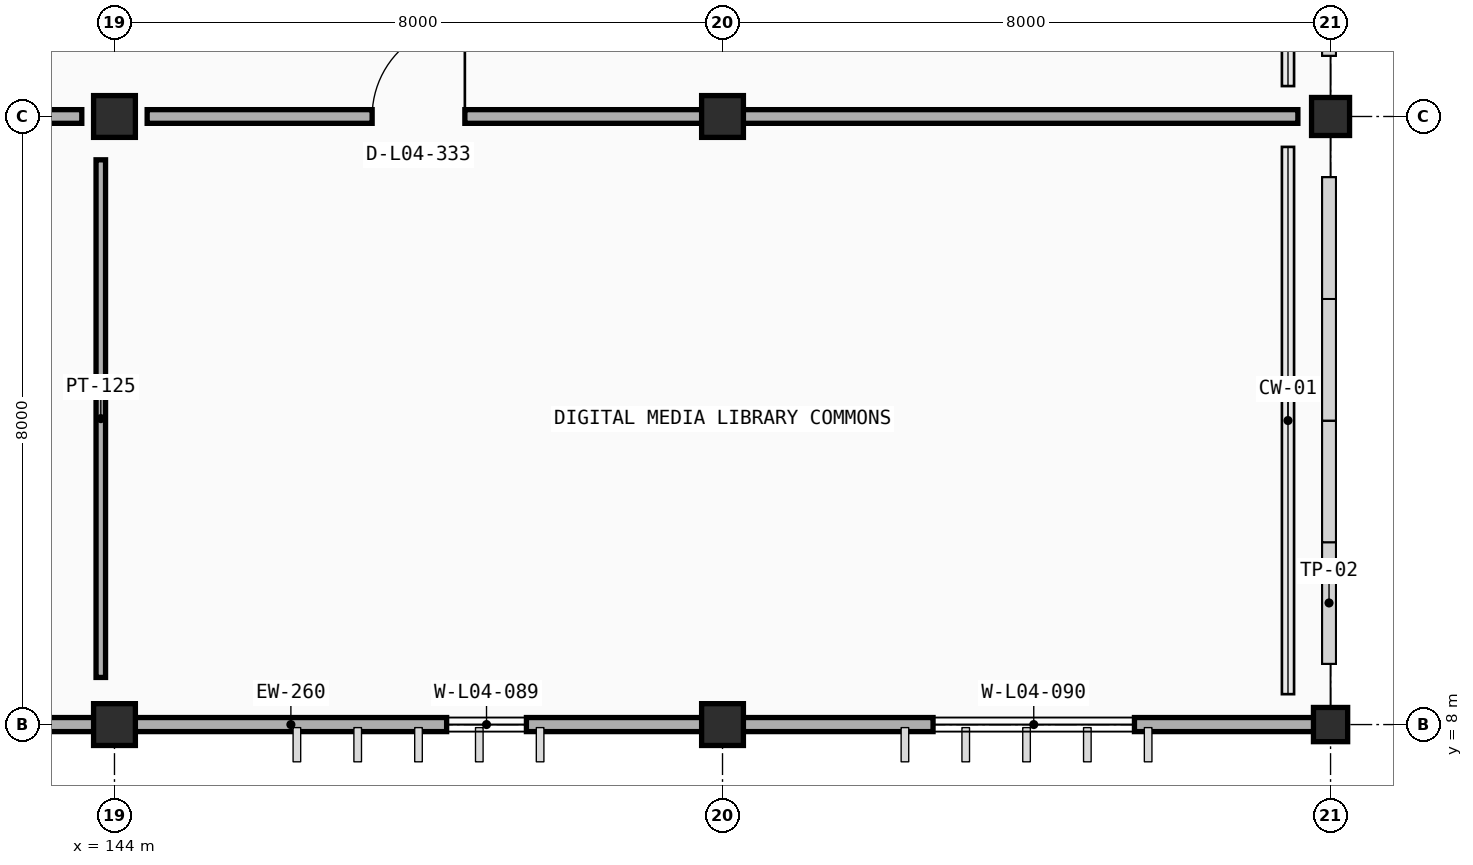
"""IFC4 building model, lengths in metres.
Left out: names, types, materials, properties, quantities, classifications, styles, units other than length and angle.
Written with IfcOpenShell. Run it as: python <this file> out.ifc"""

import sys

from ifc_helpers import new_model, si_unit, direction, frame, frame_2d, origin, origin_2d, place, context, subcontext, project, spatial, rectangle, extrude, element, fill, save


model = new_model("IFC4")
c1 = context("Model", 3, precision=1e-05, world=origin(), true_north=direction((0.0, 1.0)))
c2 = subcontext(c1, "Body", "Model", "MODEL_VIEW")
j1 = project(units=[si_unit("LENGTHUNIT", "METRE"), si_unit("PLANEANGLEUNIT", "RADIAN")], contexts=[c1])
p1 = place(None, origin())
s1 = spatial("IfcSite", under=j1, at=p1, CompositionType="ELEMENT")
p2 = place(p1, origin())
s2 = spatial("IfcBuilding", under=s1, at=p2, CompositionType="ELEMENT")
p3 = place(p2, frame((0.0, 0.0, 13.8)))
s3 = spatial("IfcBuildingStorey", under=s2, at=p3, CompositionType="ELEMENT", Elevation=13.8)
for number, where, z_axis, x_axis in (
    (1, (144.0, 8.0, 0.0), (0.0, 0.0, 1.0), (1.0, 0.0, 0.0)),
    (2, (152.0, 8.0, 0.0), (0.0, 0.0, 1.0), (1.0, 0.0, 0.0)),
):
    element("IfcColumn", number, at=place(p3, frame(where, z_axis=z_axis, x_axis=x_axis)), inside=s3, PredefinedType="COLUMN", context=c2, shape_type="SweptSolid", body=[
        extrude(rectangle(XDim=0.55, YDim=0.55, at=origin_2d()), origin(), (0.0, 0.0, 1.0), 4.2),
    ])
p4 = place(p3, frame((160.0, 8.0, 0.0), z_axis=(0.0, 0.0, 1.0), x_axis=(1.0, 0.0, 0.0)))
e3 = element("IfcColumn", 3, at=p4, inside=s3, PredefinedType="COLUMN", context=c2, shape_type="SweptSolid", body=[
    extrude(rectangle(XDim=0.45, YDim=0.45, at=origin_2d()), origin(), (0.0, 0.0, 1.0), 4.2),
])
for number, where, z_axis, x_axis in (
    (4, (144.0, 16.0, 0.0), (0.0, 0.0, 1.0), (1.0, 0.0, 0.0)),
    (5, (152.0, 16.0, 0.0), (0.0, 0.0, 1.0), (1.0, 0.0, 0.0)),
):
    element("IfcColumn", number, at=place(p3, frame(where, z_axis=z_axis, x_axis=x_axis)), inside=s3, PredefinedType="COLUMN", context=c2, shape_type="SweptSolid", body=[
        extrude(rectangle(XDim=0.55, YDim=0.55, at=origin_2d()), origin(), (0.0, 0.0, 1.0), 4.2),
    ])
p5 = place(p3, frame((160.0, 16.0, 0.0), z_axis=(0.0, 0.0, 1.0), x_axis=(1.0, 0.0, 0.0)))
e6 = element("IfcColumn", 6, at=p5, inside=s3, PredefinedType="COLUMN", context=c2, shape_type="SweptSolid", body=[
    extrude(rectangle(XDim=0.5, YDim=0.5, at=origin_2d()), origin(), (0.0, 0.0, 1.0), 4.2),
])
p6 = place(p3, frame((143.728, 8.0, 0.0), z_axis=(0.0, 0.0, 1.0), x_axis=(-1.0, 0.0, 0.0)))
e7 = element("IfcWall", 7, at=p6, inside=s3, PredefinedType="STANDARD", context=c2, shape_type="SweptSolid", body=[
    extrude(rectangle(XDim=7.456, YDim=0.185, at=frame_2d((3.728, 0.0))), origin(), (0.0, 0.0, 1.0), 3.325),
])
p7 = place(p6, frame((2.308, 0.0, 0.9)))
e8 = element("IfcOpeningElement", 8, at=p7, cuts=e7, PredefinedType="OPENING", context=c2, shape_type="SweptSolid", body=[
    extrude(rectangle(XDim=2.85, YDim=1.25, at=frame_2d((1.425, 0.625))), frame((0.0, 0.103, 0.0), z_axis=(0.0, -1.0, 0.0), x_axis=(1.0, 0.0, 0.0)), (0.0, 0.0, 1.0), 0.205),
])
p8 = place(p3, frame((151.728, 8.0, 0.0), z_axis=(0.0, 0.0, 1.0), x_axis=(-1.0, 0.0, 0.0)))
e9 = element("IfcWall", 9, at=p8, inside=s3, PredefinedType="STANDARD", context=c2, shape_type="SweptSolid", body=[
    extrude(rectangle(XDim=7.456, YDim=0.185, at=frame_2d((3.728, 0.0))), origin(), (0.0, 0.0, 1.0), 3.325),
])
p9 = place(p8, frame((2.308, 0.0, 0.9)))
e10 = element("IfcOpeningElement", 10, at=p9, cuts=e9, PredefinedType="OPENING", context=c2, shape_type="SweptSolid", body=[
    extrude(rectangle(XDim=1.05, YDim=1.4, at=frame_2d((0.525, 0.7))), frame((0.0, 0.103, 0.0), z_axis=(0.0, -1.0, 0.0), x_axis=(1.0, 0.0, 0.0)), (0.0, 0.0, 1.0), 0.205),
])
p10 = place(p3, frame((159.778, 8.0, 0.0), z_axis=(0.0, 0.0, 1.0), x_axis=(-1.0, 0.0, 0.0)))
e11 = element("IfcWall", 11, at=p10, inside=s3, PredefinedType="STANDARD", context=c2, shape_type="SweptSolid", body=[
    extrude(rectangle(XDim=7.506, YDim=0.185, at=frame_2d((3.753, 0.0))), origin(), (0.0, 0.0, 1.0), 3.35),
])
p11 = place(p10, frame((2.358, 0.0, 0.9)))
e12 = element("IfcOpeningElement", 12, at=p11, cuts=e11, PredefinedType="OPENING", context=c2, shape_type="SweptSolid", body=[
    extrude(rectangle(XDim=2.65, YDim=1.25, at=frame_2d((1.325, 0.625))), frame((0.0, 0.103, 0.0), z_axis=(0.0, -1.0, 0.0), x_axis=(1.0, 0.0, 0.0)), (0.0, 0.0, 1.0), 0.205),
])
for number, where, z_axis, x_axis in (
    (13, (159.76, 8.22, 0.0), (0.0, 0.0, 1.0), (-1.0, 0.0, 0.0)),
    (14, (159.76, 15.78, 0.0), (0.0, 0.0, 1.0), (-1.0, 0.0, 0.0)),
    (15, (159.76, 16.22, 0.0), (0.0, 0.0, 1.0), (-1.0, 0.0, 0.0)),
):
    element("IfcWall", number, at=place(p3, frame(where, z_axis=z_axis, x_axis=x_axis)), inside=s3, PredefinedType="PARAPET", context=c2, shape_type="SweptSolid", body=[
        extrude(rectangle(XDim=0.32, YDim=0.2, at=frame_2d((0.16, 0.0))), origin(), (0.0, 0.0, 1.0), 3.35),
    ])
p12 = place(p3, frame((160.26, 3.98, -0.02), z_axis=(0.0, 0.0, 1.0), x_axis=(0.0, 1.0, 0.0)))
e16 = element("IfcWall", 16, at=p12, inside=s3, PredefinedType="PARAPET", context=c2, shape_type="SweptSolid", body=[
    extrude(rectangle(XDim=3.98, YDim=0.2, at=frame_2d((1.99, 0.0))), origin(), (0.0, 0.0, 1.0), 1.001),
])
p13 = place(p3, frame((160.26, 7.96, -0.02), z_axis=(0.0, 0.0, 1.0), x_axis=(0.0, 1.0, 0.0)))
e17 = element("IfcWall", 17, at=p13, inside=s3, PredefinedType="PARAPET", context=c2, shape_type="SweptSolid", body=[
    extrude(rectangle(XDim=3.98, YDim=0.2, at=frame_2d((1.99, 0.0))), origin(), (0.0, 0.0, 1.0), 1.502),
])
p14 = place(p3, frame((160.26, 11.94, -0.02), z_axis=(0.0, 0.0, 1.0), x_axis=(0.0, 1.0, 0.0)))
e18 = element("IfcWall", 18, at=p14, inside=s3, PredefinedType="PARAPET", context=c2, shape_type="SweptSolid", body=[
    extrude(rectangle(XDim=3.98, YDim=0.2, at=frame_2d((1.99, 0.0))), origin(), (0.0, 0.0, 1.0), 2.003),
])
p15 = place(p3, frame((160.26, 15.92, -0.02), z_axis=(0.0, 0.0, 1.0), x_axis=(0.0, 1.0, 0.0)))
e19 = element("IfcWall", 19, at=p15, inside=s3, PredefinedType="PARAPET", context=c2, shape_type="SweptSolid", body=[
    extrude(rectangle(XDim=3.98, YDim=0.2, at=frame_2d((1.99, 0.0))), origin(), (0.0, 0.0, 1.0), 2.503),
])
p16 = place(p3, frame((128.43, 16.0, 0.0), z_axis=(0.0, 0.0, 1.0), x_axis=(1.0, 0.0, 0.0)))
e20 = element("IfcWall", 20, at=p16, inside=s3, PredefinedType="PARTITIONING", context=c2, shape_type="SweptSolid", body=[
    extrude(rectangle(XDim=15.14, YDim=0.18, at=frame_2d((7.57, 0.0))), origin(), (0.0, 0.0, 1.0), 3.275),
])
p17 = place(p16, frame((3.07, 0.0, 0.0)))
e21 = element("IfcOpeningElement", 21, at=p17, cuts=e20, PredefinedType="OPENING", context=c2, shape_type="SweptSolid", body=[
    extrude(rectangle(XDim=1.0, YDim=2.15, at=frame_2d((0.5, 1.075))), frame((0.0, 0.1, 0.0), z_axis=(0.0, -1.0, 0.0), x_axis=(1.0, 0.0, 0.0)), (0.0, 0.0, 1.0), 0.2),
])
p18 = place(p3, frame((143.82, 8.62, 0.0), z_axis=(0.0, 0.0, 1.0), x_axis=(0.0, 1.0, 0.0)))
e22 = element("IfcWall", 22, at=p18, inside=s3, PredefinedType="PARTITIONING", context=c2, shape_type="SweptSolid", body=[
    extrude(rectangle(XDim=6.81, YDim=0.125, at=frame_2d((3.405, 0.0))), origin(), (0.0, 0.0, 1.0), 3.225),
])
p19 = place(p3, frame((144.43, 16.0, 0.0), z_axis=(0.0, 0.0, 1.0), x_axis=(1.0, 0.0, 0.0)))
e23 = element("IfcWall", 23, at=p19, inside=s3, PredefinedType="PARTITIONING", context=c2, shape_type="SweptSolid", body=[
    extrude(rectangle(XDim=15.14, YDim=0.18, at=frame_2d((7.57, 0.0))), origin(), (0.0, 0.0, 1.0), 3.275),
])
p20 = place(p19, frame((2.96, 0.0, 0.0)))
e24 = element("IfcOpeningElement", 24, at=p20, cuts=e23, PredefinedType="OPENING", context=c2, shape_type="SweptSolid", body=[
    extrude(rectangle(XDim=1.22, YDim=2.18, at=frame_2d((0.61, 1.09))), frame((0.0, 0.1, 0.0), z_axis=(0.0, -1.0, 0.0), x_axis=(1.0, 0.0, 0.0)), (0.0, 0.0, 1.0), 0.2),
])
p21 = place(p9, origin())
e25 = element("IfcWindow", 25, at=p21, inside=s3, PartitioningType="SINGLE_PANEL", PredefinedType="WINDOW", context=c2, shape_type="SweptSolid", body=[
    extrude(rectangle(XDim=1.05, YDim=1.4, at=frame_2d((0.525, 0.7))), frame((0.0, 0.03, 0.0), z_axis=(0.0, -1.0, 0.0), x_axis=(1.0, 0.0, 0.0)), (0.0, 0.0, 1.0), 0.06),
])
fill(e10, e25)
p22 = place(p11, origin())
e26 = element("IfcWindow", 26, at=p22, inside=s3, PartitioningType="DOUBLE_PANEL_VERTICAL", PredefinedType="WINDOW", context=c2, shape_type="SweptSolid", body=[
    extrude(rectangle(XDim=2.65, YDim=1.25, at=frame_2d((1.325, 0.625))), frame((0.0, 0.03, 0.0), z_axis=(0.0, -1.0, 0.0), x_axis=(1.0, 0.0, 0.0)), (0.0, 0.0, 1.0), 0.06),
])
fill(e12, e26)
p23 = place(p20, origin())
e27 = element("IfcDoor", 27, at=p23, inside=s3, OperationType="SINGLE_SWING_RIGHT", PredefinedType="DOOR", context=c2, shape_type="SweptSolid", body=[
    extrude(rectangle(XDim=1.22, YDim=2.18, at=frame_2d((0.61, 1.09))), frame((0.0, 0.025, 0.0), z_axis=(0.0, -1.0, 0.0), x_axis=(1.0, 0.0, 0.0)), (0.0, 0.0, 1.0), 0.05),
])
fill(e24, e27)
save(model, sys.argv[1])
